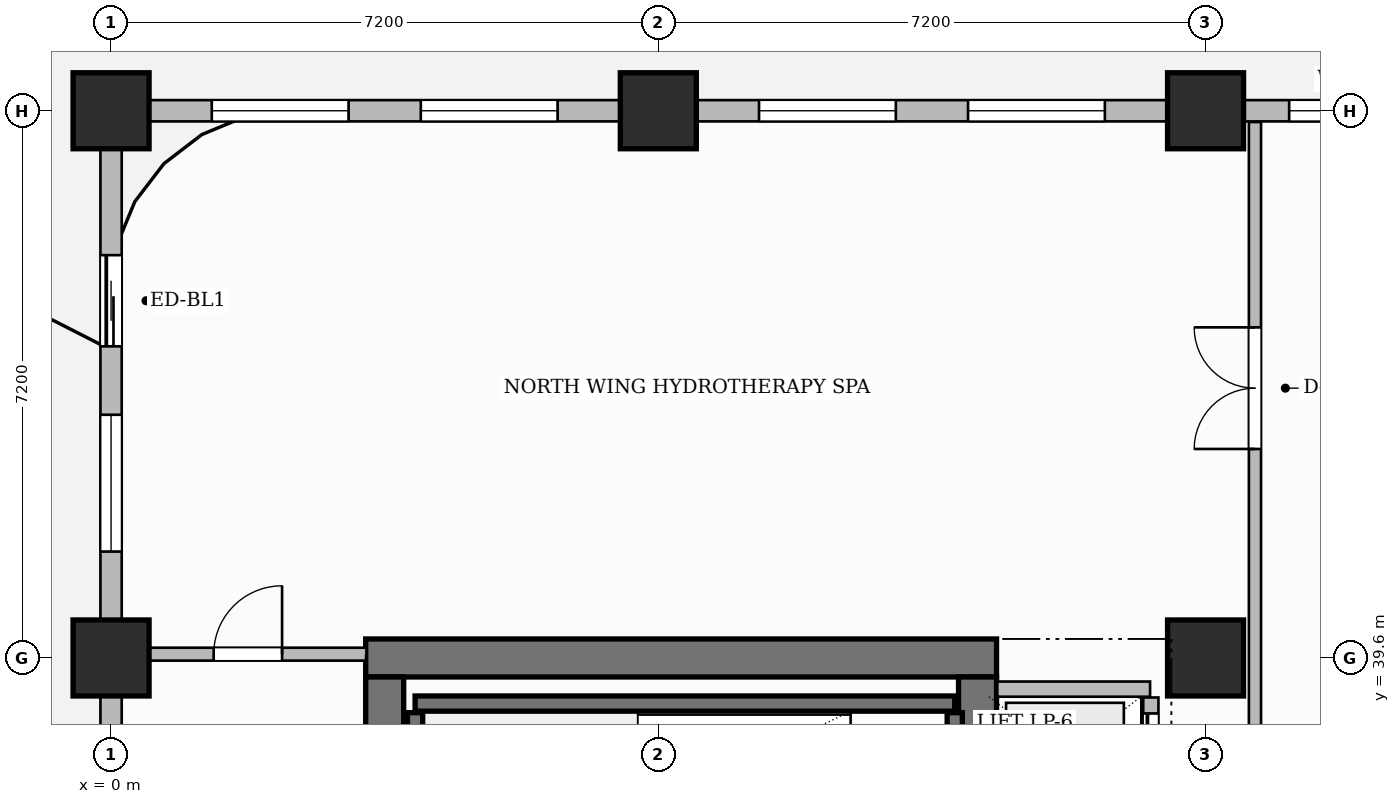
"""IFC4 building model, lengths in metres.
Left out: names, types, materials, properties, quantities, classifications, styles, units other than length and angle.
Written with IfcOpenShell. Run it as: python <this file> out.ifc"""

import sys

from ifc_helpers import new_model, si_unit, direction, frame, frame_2d, origin, origin_2d, place, context, subcontext, project, spatial, rectangle, extrude, source, transform, mapped, element, fill, save


model = new_model("IFC4")
c1 = context("Model", 3, precision=1e-05, world=origin(), true_north=direction((0.0, 1.0)))
c2 = subcontext(c1, "Body", "Model", "MODEL_VIEW")
j1 = project(units=[si_unit("LENGTHUNIT", "METRE"), si_unit("PLANEANGLEUNIT", "RADIAN")], contexts=[c1])
p1 = place(None, origin())
s1 = spatial("IfcSite", under=j1, at=p1, CompositionType="ELEMENT")
p2 = place(p1, origin())
s2 = spatial("IfcBuilding", under=s1, at=p2, CompositionType="ELEMENT")
p3 = place(p2, frame((0.0, 0.0, 158.0)))
s3 = spatial("IfcBuildingStorey", under=s2, at=p3, CompositionType="ELEMENT", Elevation=158.0)
p4 = place(p3, frame((3.35, 39.6, 0.0), z_axis=(0.0, 0.0, 1.0), x_axis=(1.0, 0.0, 0.0)))
e1 = element("IfcWall", 1, at=p4, inside=s3, PredefinedType="SHEAR", context=c2, shape_type="SweptSolid", body=[
    extrude(rectangle(XDim=8.3, YDim=0.5, at=frame_2d((4.15, 0.0))), origin(), (0.0, 0.0, 1.0), 3.85),
])
p5 = place(p3, frame((3.6, 25.45, 0.0), z_axis=(0.0, 0.0, 1.0), x_axis=(0.0, 1.0, 0.0)))
e2 = element("IfcWall", 2, at=p5, inside=s3, PredefinedType="SHEAR", context=c2, shape_type="SweptSolid", body=[
    extrude(rectangle(XDim=13.9, YDim=0.5, at=frame_2d((6.95, 0.0))), origin(), (0.0, 0.0, 1.0), 3.85),
])
p6 = place(p3, frame((11.4, 25.45, 0.0), z_axis=(0.0, 0.0, 1.0), x_axis=(0.0, 1.0, 0.0)))
e3 = element("IfcWall", 3, at=p6, inside=s3, PredefinedType="SHEAR", context=c2, shape_type="SweptSolid", body=[
    extrude(rectangle(XDim=13.9, YDim=0.5, at=frame_2d((6.95, 0.0))), origin(), (0.0, 0.0, 1.0), 3.85),
])
p7 = place(p6, frame((6.52, 0.0, 0.0)))
e4 = element("IfcOpeningElement", 4, at=p7, cuts=e3, PredefinedType="OPENING", context=c2, shape_type="SweptSolid", body=[
    extrude(rectangle(XDim=1.5, YDim=2.2, at=frame_2d((0.75, 1.1))), frame((0.0, 0.26, 0.0), z_axis=(0.0, -1.0, 0.0), x_axis=(1.0, 0.0, 0.0)), (0.0, 0.0, 1.0), 0.52),
])
m1 = source(origin(), c2, "Body", "SweptSolid", [
    extrude(rectangle(XDim=1.0, YDim=1.0, at=origin_2d()), origin(), (0.0, 0.0, 1.0), 3.85),
])
for number, where, z_axis, x_axis in (
    (5, (0.0, 39.6, 0.0), (0.0, 0.0, 1.0), (1.0, 0.0, 0.0)),
    (6, (0.0, 46.8, 0.0), (0.0, 0.0, 1.0), (1.0, 0.0, 0.0)),
    (7, (7.2, 46.8, 0.0), (0.0, 0.0, 1.0), (1.0, 0.0, 0.0)),
    (8, (14.4, 39.6, 0.0), (0.0, 0.0, 1.0), (1.0, 0.0, 0.0)),
    (9, (14.4, 46.8, 0.0), (0.0, 0.0, 1.0), (1.0, 0.0, 0.0)),
):
    element("IfcColumn", number, at=place(p3, frame(where, z_axis=z_axis, x_axis=x_axis)), inside=s3, PredefinedType="COLUMN", context=c2, shape_type="MappedRepresentation", body=[
        mapped(m1, transform((0.0, 0.0, 0.0), scale=1.0)),
    ])
p8 = place(p3, frame((4.0, 39.0, 0.0), z_axis=(0.0, 0.0, 1.0), x_axis=(1.0, 0.0, 0.0)))
e10 = element("IfcWall", 10, at=p8, inside=s3, PredefinedType="SHEAR", context=c2, shape_type="SweptSolid", body=[
    extrude(rectangle(XDim=7.1, YDim=0.2, at=frame_2d((3.55, 0.0))), origin(), (0.0, 0.0, 1.0), 3.85),
])
for number, where, z_axis, x_axis in (
    (11, (4.0, 36.18, 0.0), (0.0, 0.0, 1.0), (0.0, 1.0, 0.0)),
    (12, (11.1, 36.18, 0.0), (0.0, 0.0, 1.0), (0.0, 1.0, 0.0)),
):
    element("IfcWall", number, at=place(p3, frame(where, z_axis=z_axis, x_axis=x_axis)), inside=s3, PredefinedType="SHEAR", context=c2, shape_type="SweptSolid", body=[
        extrude(rectangle(XDim=2.7, YDim=0.2, at=frame_2d((1.35, 0.0))), origin(), (0.0, 0.0, 1.0), 3.85),
    ])
p9 = place(p3, frame((11.66, 39.19, 0.0), z_axis=(0.0, 0.0, 1.0), x_axis=(1.0, 0.0, 0.0)))
e13 = element("IfcWall", 13, at=p9, inside=s3, PredefinedType="PARTITIONING", context=c2, shape_type="SweptSolid", body=[
    extrude(rectangle(XDim=2.01, YDim=0.2, at=frame_2d((1.005, 0.0))), origin(), (0.0, 0.0, 1.0), 3.6),
])
p10 = place(p3, frame((13.68, 34.36, 0.0), z_axis=(0.0, 0.0, 1.0), x_axis=(0.0, 1.0, 0.0)))
e14 = element("IfcWall", 14, at=p10, inside=s3, PredefinedType="PARTITIONING", context=c2, shape_type="SweptSolid", body=[
    extrude(rectangle(XDim=4.72, YDim=0.2, at=frame_2d((2.36, 0.0))), origin(), (0.0, 0.0, 1.0), 3.6),
])
p11 = place(p10, frame((0.21, 0.0, 0.0)))
e15 = element("IfcOpeningElement", 15, at=p11, cuts=e14, PredefinedType="OPENING", context=c2, shape_type="SweptSolid", body=[
    extrude(rectangle(XDim=1.1, YDim=2.2, at=frame_2d((0.55, 1.1))), frame((0.0, 0.11, 0.0), z_axis=(0.0, -1.0, 0.0), x_axis=(1.0, 0.0, 0.0)), (0.0, 0.0, 1.0), 0.22),
])
p12 = place(p10, frame((1.81, 0.0, 0.0)))
e16 = element("IfcOpeningElement", 16, at=p12, cuts=e14, PredefinedType="OPENING", context=c2, shape_type="SweptSolid", body=[
    extrude(rectangle(XDim=1.1, YDim=2.2, at=frame_2d((0.55, 1.1))), frame((0.0, 0.11, 0.0), z_axis=(0.0, -1.0, 0.0), x_axis=(1.0, 0.0, 0.0)), (0.0, 0.0, 1.0), 0.22),
])
p13 = place(p10, frame((3.41, 0.0, 0.0)))
e17 = element("IfcOpeningElement", 17, at=p13, cuts=e14, PredefinedType="OPENING", context=c2, shape_type="SweptSolid", body=[
    extrude(rectangle(XDim=1.1, YDim=2.2, at=frame_2d((0.55, 1.1))), frame((0.0, 0.11, 0.0), z_axis=(0.0, -1.0, 0.0), x_axis=(1.0, 0.0, 0.0)), (0.0, 0.0, 1.0), 0.22),
])
p14 = place(p3, frame((0.24, 39.65, 0.0), z_axis=(0.0, 0.0, 1.0), x_axis=(1.0, 0.0, 0.0)))
e18 = element("IfcWall", 18, at=p14, inside=s3, PredefinedType="PARTITIONING", context=c2, shape_type="SweptSolid", body=[
    extrude(rectangle(XDim=3.12, YDim=0.17, at=frame_2d((1.56, 0.0))), origin(), (0.0, 0.0, 1.0), 3.6),
])
p15 = place(p14, frame((1.11, 0.0, 0.0)))
e19 = element("IfcOpeningElement", 19, at=p15, cuts=e18, PredefinedType="OPENING", context=c2, shape_type="SweptSolid", body=[
    extrude(rectangle(XDim=0.9, YDim=2.15, at=frame_2d((0.45, 1.075))), frame((0.0, 0.095, 0.0), z_axis=(0.0, -1.0, 0.0), x_axis=(1.0, 0.0, 0.0)), (0.0, 0.0, 1.0), 0.19),
])
p16 = place(p3, frame((15.05, 34.34, 0.0), z_axis=(0.0, 0.0, 1.0), x_axis=(0.0, 1.0, 0.0)))
e20 = element("IfcWall", 20, at=p16, inside=s3, PredefinedType="PARTITIONING", context=c2, shape_type="SweptSolid", body=[
    extrude(rectangle(XDim=12.312, YDim=0.16, at=frame_2d((6.156, 0.0))), origin(), (0.0, 0.0, 1.0), 3.6),
])
p17 = place(p16, frame((8.01, 0.0, 0.0)))
e21 = element("IfcOpeningElement", 21, at=p17, cuts=e20, PredefinedType="OPENING", context=c2, shape_type="SweptSolid", body=[
    extrude(rectangle(XDim=1.6, YDim=2.4, at=frame_2d((0.8, 1.2))), frame((0.0, 0.09, 0.0), z_axis=(0.0, -1.0, 0.0), x_axis=(1.0, 0.0, 0.0)), (0.0, 0.0, 1.0), 0.18),
])
p18 = place(p3, frame((0.0, 25.25, 0.0), z_axis=(0.0, 0.0, 1.0), x_axis=(0.0, 1.0, 0.0)))
e22 = element("IfcWall", 22, at=p18, inside=s3, PredefinedType="SOLIDWALL", context=c2, shape_type="SweptSolid", body=[
    extrude(rectangle(XDim=21.5, YDim=0.28, at=frame_2d((10.75, 0.0))), origin(), (0.0, 0.0, 1.0), 3.085),
])
p19 = place(p18, frame((18.45, 0.0, 0.0)))
e23 = element("IfcOpeningElement", 23, at=p19, cuts=e22, PredefinedType="OPENING", context=c2, shape_type="SweptSolid", body=[
    extrude(rectangle(XDim=1.2, YDim=2.2, at=frame_2d((0.6, 1.1))), frame((0.0, 0.15, 0.0), z_axis=(0.0, -1.0, 0.0), x_axis=(1.0, 0.0, 0.0)), (0.0, 0.0, 1.0), 0.3),
])
p20 = place(p18, frame((0.8, 0.0, 0.0)))
e24 = element("IfcOpeningElement", 24, at=p20, cuts=e22, PredefinedType="OPENING", context=c2, shape_type="SweptSolid", body=[
    extrude(rectangle(XDim=1.2, YDim=2.2, at=frame_2d((0.6, 1.1))), frame((0.0, 0.15, 0.0), z_axis=(0.0, -1.0, 0.0), x_axis=(1.0, 0.0, 0.0)), (0.0, 0.0, 1.0), 0.3),
])
p21 = place(p18, frame((3.425, 0.0, 0.8)))
e25 = element("IfcOpeningElement", 25, at=p21, cuts=e22, PredefinedType="OPENING", context=c2, shape_type="SweptSolid", body=[
    extrude(rectangle(XDim=1.8, YDim=1.85, at=frame_2d((0.9, 0.925))), frame((0.0, 0.15, 0.0), z_axis=(0.0, -1.0, 0.0), x_axis=(1.0, 0.0, 0.0)), (0.0, 0.0, 1.0), 0.3),
])
p22 = place(p18, frame((8.475, 0.0, 0.8)))
e26 = element("IfcOpeningElement", 26, at=p22, cuts=e22, PredefinedType="OPENING", context=c2, shape_type="SweptSolid", body=[
    extrude(rectangle(XDim=1.8, YDim=1.85, at=frame_2d((0.9, 0.925))), frame((0.0, 0.15, 0.0), z_axis=(0.0, -1.0, 0.0), x_axis=(1.0, 0.0, 0.0)), (0.0, 0.0, 1.0), 0.3),
])
p23 = place(p18, frame((11.225, 0.0, 0.8)))
e27 = element("IfcOpeningElement", 27, at=p23, cuts=e22, PredefinedType="OPENING", context=c2, shape_type="SweptSolid", body=[
    extrude(rectangle(XDim=1.8, YDim=1.85, at=frame_2d((0.9, 0.925))), frame((0.0, 0.15, 0.0), z_axis=(0.0, -1.0, 0.0), x_axis=(1.0, 0.0, 0.0)), (0.0, 0.0, 1.0), 0.3),
])
p24 = place(p18, frame((15.75, 0.0, 0.8)))
e28 = element("IfcOpeningElement", 28, at=p24, cuts=e22, PredefinedType="OPENING", context=c2, shape_type="SweptSolid", body=[
    extrude(rectangle(XDim=1.8, YDim=1.85, at=frame_2d((0.9, 0.925))), frame((0.0, 0.15, 0.0), z_axis=(0.0, -1.0, 0.0), x_axis=(1.0, 0.0, 0.0)), (0.0, 0.0, 1.0), 0.3),
])
p25 = place(p3, frame((0.0, 46.8, 0.0), z_axis=(0.0, 0.0, 1.0), x_axis=(1.0, 0.0, 0.0)))
e29 = element("IfcWall", 29, at=p25, inside=s3, PredefinedType="SOLIDWALL", context=c2, shape_type="SweptSolid", body=[
    extrude(rectangle(XDim=18.0, YDim=0.28, at=frame_2d((9.0, 0.0))), origin(), (0.0, 0.0, 1.0), 3.085),
])
p26 = place(p25, frame((1.325, 0.0, 0.8)))
e30 = element("IfcOpeningElement", 30, at=p26, cuts=e29, PredefinedType="OPENING", context=c2, shape_type="SweptSolid", body=[
    extrude(rectangle(XDim=1.8, YDim=1.85, at=frame_2d((0.9, 0.925))), frame((0.0, 0.15, 0.0), z_axis=(0.0, -1.0, 0.0), x_axis=(1.0, 0.0, 0.0)), (0.0, 0.0, 1.0), 0.3),
])
p27 = place(p25, frame((4.075, 0.0, 0.8)))
e31 = element("IfcOpeningElement", 31, at=p27, cuts=e29, PredefinedType="OPENING", context=c2, shape_type="SweptSolid", body=[
    extrude(rectangle(XDim=1.8, YDim=1.85, at=frame_2d((0.9, 0.925))), frame((0.0, 0.15, 0.0), z_axis=(0.0, -1.0, 0.0), x_axis=(1.0, 0.0, 0.0)), (0.0, 0.0, 1.0), 0.3),
])
p28 = place(p25, frame((8.525, 0.0, 0.8)))
e32 = element("IfcOpeningElement", 32, at=p28, cuts=e29, PredefinedType="OPENING", context=c2, shape_type="SweptSolid", body=[
    extrude(rectangle(XDim=1.8, YDim=1.85, at=frame_2d((0.9, 0.925))), frame((0.0, 0.15, 0.0), z_axis=(0.0, -1.0, 0.0), x_axis=(1.0, 0.0, 0.0)), (0.0, 0.0, 1.0), 0.3),
])
p29 = place(p25, frame((11.275, 0.0, 0.8)))
e33 = element("IfcOpeningElement", 33, at=p29, cuts=e29, PredefinedType="OPENING", context=c2, shape_type="SweptSolid", body=[
    extrude(rectangle(XDim=1.8, YDim=1.85, at=frame_2d((0.9, 0.925))), frame((0.0, 0.15, 0.0), z_axis=(0.0, -1.0, 0.0), x_axis=(1.0, 0.0, 0.0)), (0.0, 0.0, 1.0), 0.3),
])
p30 = place(p25, frame((15.5, 0.0, 0.8)))
e34 = element("IfcOpeningElement", 34, at=p30, cuts=e29, PredefinedType="OPENING", context=c2, shape_type="SweptSolid", body=[
    extrude(rectangle(XDim=1.4, YDim=1.85, at=frame_2d((0.7, 0.925))), frame((0.0, 0.15, 0.0), z_axis=(0.0, -1.0, 0.0), x_axis=(1.0, 0.0, 0.0)), (0.0, 0.0, 1.0), 0.3),
])
m2 = source(origin(), c2, "Body", "SweptSolid", [
    extrude(rectangle(XDim=0.9, YDim=2.15, at=frame_2d((0.45, 1.075))), frame((0.0, 0.025, 0.0), z_axis=(0.0, -1.0, 0.0), x_axis=(1.0, 0.0, 0.0)), (0.0, 0.0, 1.0), 0.05),
])
p31 = place(p15, origin())
e35 = element("IfcDoor", 35, at=p31, inside=s3, OperationType="SINGLE_SWING_RIGHT", PredefinedType="DOOR", context=c2, shape_type="MappedRepresentation", body=[
    mapped(m2, transform((0.0, 0.0, 0.0), scale=1.0)),
])
fill(e19, e35)
m3 = source(origin(), c2, "Body", "SweptSolid", [
    extrude(rectangle(XDim=1.6, YDim=2.4, at=frame_2d((0.8, 1.2))), frame((0.0, 0.025, 0.0), z_axis=(0.0, -1.0, 0.0), x_axis=(1.0, 0.0, 0.0)), (0.0, 0.0, 1.0), 0.05),
])
p32 = place(p17, origin())
e36 = element("IfcDoor", 36, at=p32, inside=s3, OperationType="DOUBLE_DOOR_SINGLE_SWING", PredefinedType="DOOR", context=c2, shape_type="MappedRepresentation", body=[
    mapped(m3, transform((0.0, 0.0, 0.0), scale=1.0)),
])
fill(e21, e36)
m4 = source(origin(), c2, "Body", "SweptSolid", [
    extrude(rectangle(XDim=1.1, YDim=2.2, at=frame_2d((0.55, 1.1))), frame((0.0, 0.025, 0.0), z_axis=(0.0, -1.0, 0.0), x_axis=(1.0, 0.0, 0.0)), (0.0, 0.0, 1.0), 0.05),
])
p33 = place(p13, origin())
e37 = element("IfcDoor", 37, at=p33, inside=s3, OperationType="SLIDING_TO_LEFT", PredefinedType="DOOR", context=c2, shape_type="MappedRepresentation", body=[
    mapped(m4, transform((0.0, 0.0, 0.0), scale=1.0)),
])
fill(e17, e37)
m5 = source(origin(), c2, "Body", "SweptSolid", [
    extrude(rectangle(XDim=1.2, YDim=2.2, at=frame_2d((0.6, 1.1))), frame((0.0, 0.025, 0.0), z_axis=(0.0, -1.0, 0.0), x_axis=(1.0, 0.0, 0.0)), (0.0, 0.0, 1.0), 0.05),
])
p34 = place(p19, origin())
e38 = element("IfcDoor", 38, at=p34, inside=s3, OperationType="SLIDING_TO_LEFT", PredefinedType="DOOR", context=c2, shape_type="MappedRepresentation", body=[
    mapped(m5, transform((0.0, 0.0, 0.0), scale=1.0)),
])
fill(e23, e38)
m6 = source(origin(), c2, "Body", "SweptSolid", [
    extrude(rectangle(XDim=1.8, YDim=1.85, at=frame_2d((0.9, 0.925))), frame((0.0, 0.03, 0.0), z_axis=(0.0, -1.0, 0.0), x_axis=(1.0, 0.0, 0.0)), (0.0, 0.0, 1.0), 0.06),
])
p35 = place(p24, origin())
e39 = element("IfcWindow", 39, at=p35, inside=s3, PartitioningType="DOUBLE_PANEL_VERTICAL", PredefinedType="WINDOW", context=c2, shape_type="MappedRepresentation", body=[
    mapped(m6, transform((0.0, 0.0, 0.0), scale=1.0)),
])
fill(e28, e39)
p36 = place(p26, origin())
e40 = element("IfcWindow", 40, at=p36, inside=s3, PartitioningType="DOUBLE_PANEL_VERTICAL", PredefinedType="WINDOW", context=c2, shape_type="MappedRepresentation", body=[
    mapped(m6, transform((0.0, 0.0, 0.0), scale=1.0)),
])
fill(e30, e40)
p37 = place(p27, origin())
e41 = element("IfcWindow", 41, at=p37, inside=s3, PartitioningType="DOUBLE_PANEL_VERTICAL", PredefinedType="WINDOW", context=c2, shape_type="MappedRepresentation", body=[
    mapped(m6, transform((0.0, 0.0, 0.0), scale=1.0)),
])
fill(e31, e41)
p38 = place(p28, origin())
e42 = element("IfcWindow", 42, at=p38, inside=s3, PartitioningType="DOUBLE_PANEL_VERTICAL", PredefinedType="WINDOW", context=c2, shape_type="MappedRepresentation", body=[
    mapped(m6, transform((0.0, 0.0, 0.0), scale=1.0)),
])
fill(e32, e42)
p39 = place(p29, origin())
e43 = element("IfcWindow", 43, at=p39, inside=s3, PartitioningType="DOUBLE_PANEL_VERTICAL", PredefinedType="WINDOW", context=c2, shape_type="MappedRepresentation", body=[
    mapped(m6, transform((0.0, 0.0, 0.0), scale=1.0)),
])
fill(e33, e43)
m7 = source(origin(), c2, "Body", "SweptSolid", [
    extrude(rectangle(XDim=1.4, YDim=1.85, at=frame_2d((0.7, 0.925))), frame((0.0, 0.03, 0.0), z_axis=(0.0, -1.0, 0.0), x_axis=(1.0, 0.0, 0.0)), (0.0, 0.0, 1.0), 0.06),
])
p40 = place(p30, origin())
e44 = element("IfcWindow", 44, at=p40, inside=s3, PartitioningType="SINGLE_PANEL", PredefinedType="WINDOW", context=c2, shape_type="MappedRepresentation", body=[
    mapped(m7, transform((0.0, 0.0, 0.0), scale=1.0)),
])
fill(e34, e44)
save(model, sys.argv[1])
